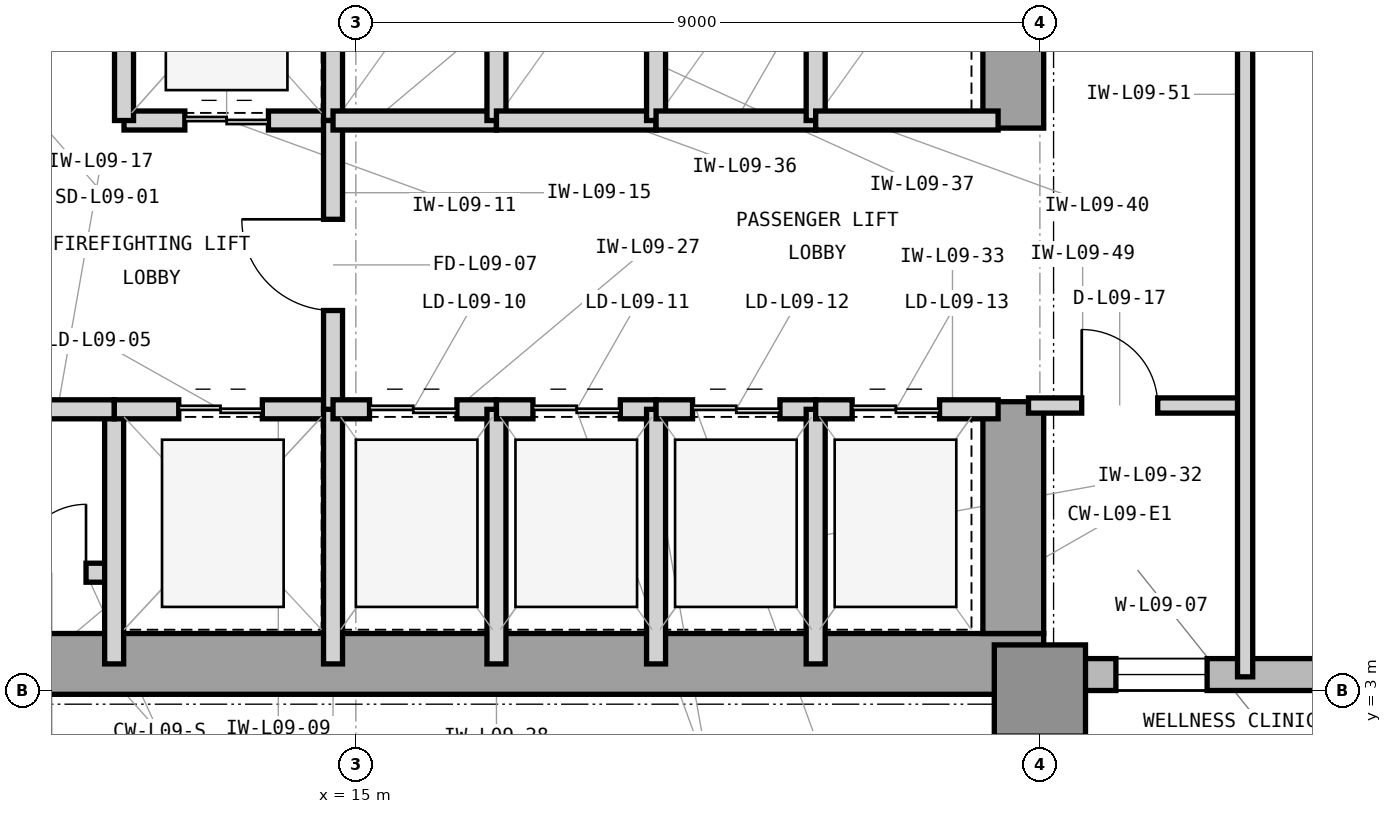
"""IFC4 building model, lengths in metres.
Left out: names, types, materials, properties, quantities, classifications, styles, units other than length and angle.
Written with IfcOpenShell. Run it as: python <this file> out.ifc"""

import sys

from ifc_helpers import new_model, si_unit, direction, frame, frame_2d, origin, origin_2d, place, context, subcontext, project, spatial, rectangle, extrude, element, fill, save


model = new_model("IFC4")
c1 = context("Model", 3, precision=1e-05, world=origin(), true_north=direction((0.0, 1.0)))
c2 = subcontext(c1, "Body", "Model", "MODEL_VIEW")
j1 = project(units=[si_unit("LENGTHUNIT", "METRE"), si_unit("PLANEANGLEUNIT", "RADIAN")], contexts=[c1])
p1 = place(None, origin())
s1 = spatial("IfcSite", under=j1, at=p1, CompositionType="ELEMENT")
p2 = place(p1, origin())
s2 = spatial("IfcBuilding", under=s1, at=p2, CompositionType="ELEMENT")
p3 = place(p2, frame((0.0, 0.0, 42.6)))
s3 = spatial("IfcBuildingStorey", under=s2, at=p3, CompositionType="ELEMENT", Elevation=42.6)
p4 = place(p3, frame((7.475, 3.35, 0.0), z_axis=(0.0, 0.0, 1.0), x_axis=(1.0, 0.0, 0.0)))
e1 = element("IfcWall", 1, at=p4, inside=s3, PredefinedType="SHEAR", context=c2, shape_type="SweptSolid", body=[
    extrude(rectangle(XDim=16.575, YDim=0.8, at=frame_2d((8.288, 0.0))), origin(), (0.0, 0.0, 1.0), 4.2),
])
p5 = place(p3, frame((23.65, 3.75, 0.0), z_axis=(0.0, 0.0, 1.0), x_axis=(0.0, 1.0, 0.0)))
e2 = element("IfcWall", 2, at=p5, inside=s3, PredefinedType="SHEAR", context=c2, shape_type="SweptSolid", body=[
    extrude(rectangle(XDim=3.05, YDim=0.8, at=frame_2d((1.525, 0.0))), origin(), (0.0, 0.0, 1.0), 4.2),
])
p6 = place(p3, frame((23.65, 10.4, 0.0), z_axis=(0.0, 0.0, 1.0), x_axis=(0.0, 1.0, 0.0)))
e3 = element("IfcWall", 3, at=p6, inside=s3, PredefinedType="SHEAR", context=c2, shape_type="SweptSolid", body=[
    extrude(rectangle(XDim=3.2, YDim=0.8, at=frame_2d((1.6, 0.0))), origin(), (0.0, 0.0, 1.0), 4.2),
])
p7 = place(p3, frame((24.0, 3.0, 0.0), z_axis=(0.0, 0.0, 1.0), x_axis=(1.0, 0.0, 0.0)))
e4 = element("IfcColumn", 4, at=p7, inside=s3, PredefinedType="COLUMN", context=c2, shape_type="SweptSolid", body=[
    extrude(rectangle(XDim=1.2, YDim=1.2, at=origin_2d()), origin(), (0.0, 0.0, 1.0), 4.2),
])
p8 = place(p3, frame((23.9, 3.21, 0.0), z_axis=(0.0, 0.0, 1.0), x_axis=(1.0, 0.0, 0.0)))
e5 = element("IfcWall", 5, at=p8, inside=s3, PredefinedType="STANDARD", context=c2, shape_type="SweptSolid", body=[
    extrude(rectangle(XDim=40.5, YDim=0.42, at=frame_2d((20.25, 0.0))), origin(), (0.0, 0.0, 1.0), 3.98),
])
p9 = place(p8, frame((1.1, 0.0, 0.85)))
e6 = element("IfcOpeningElement", 6, at=p9, cuts=e5, PredefinedType="OPENING", context=c2, shape_type="SweptSolid", body=[
    extrude(rectangle(XDim=1.2, YDim=2.45, at=frame_2d((0.6, 1.225))), frame((0.0, 0.22, 0.0), z_axis=(0.0, -1.0, 0.0), x_axis=(1.0, 0.0, 0.0)), (0.0, 0.0, 1.0), 0.44),
])
p10 = place(p8, frame((5.336, 0.0, 0.85)))
e7 = element("IfcOpeningElement", 7, at=p10, cuts=e5, PredefinedType="OPENING", context=c2, shape_type="SweptSolid", body=[
    extrude(rectangle(XDim=2.8, YDim=2.45, at=frame_2d((1.4, 1.225))), frame((0.0, 0.22, 0.0), z_axis=(0.0, -1.0, 0.0), x_axis=(1.0, 0.0, 0.0)), (0.0, 0.0, 1.0), 0.44),
])
p11 = place(p8, frame((14.336, 0.0, 0.85)))
e8 = element("IfcOpeningElement", 8, at=p11, cuts=e5, PredefinedType="OPENING", context=c2, shape_type="SweptSolid", body=[
    extrude(rectangle(XDim=2.8, YDim=2.45, at=frame_2d((1.4, 1.225))), frame((0.0, 0.22, 0.0), z_axis=(0.0, -1.0, 0.0), x_axis=(1.0, 0.0, 0.0)), (0.0, 0.0, 1.0), 0.44),
])
p12 = place(p8, frame((25.136, 0.0, 0.85)))
e9 = element("IfcOpeningElement", 9, at=p12, cuts=e5, PredefinedType="OPENING", context=c2, shape_type="SweptSolid", body=[
    extrude(rectangle(XDim=1.2, YDim=2.45, at=frame_2d((0.6, 1.225))), frame((0.0, 0.22, 0.0), z_axis=(0.0, -1.0, 0.0), x_axis=(1.0, 0.0, 0.0)), (0.0, 0.0, 1.0), 0.44),
])
p13 = place(p8, frame((34.086, 0.0, 0.85)))
e10 = element("IfcOpeningElement", 10, at=p13, cuts=e5, PredefinedType="OPENING", context=c2, shape_type="SweptSolid", body=[
    extrude(rectangle(XDim=1.2, YDim=2.45, at=frame_2d((0.6, 1.225))), frame((0.0, 0.22, 0.0), z_axis=(0.0, -1.0, 0.0), x_axis=(1.0, 0.0, 0.0)), (0.0, 0.0, 1.0), 0.44),
])
p14 = place(p3, frame((10.33, 4.55, 0.0), z_axis=(0.0, 0.0, 1.0), x_axis=(1.0, 0.0, 0.0)))
e11 = element("IfcWall", 11, at=p14, inside=s3, PredefinedType="PARTITIONING", context=c2, shape_type="SweptSolid", body=[
    extrude(rectangle(XDim=1.49, YDim=0.25, at=frame_2d((0.745, 0.0))), origin(), (0.0, 0.0, 1.0), 3.97),
])
p15 = place(p14, frame((0.22, 0.0, 0.0)))
e12 = element("IfcOpeningElement", 12, at=p15, cuts=e11, PredefinedType="OPENING", context=c2, shape_type="SweptSolid", body=[
    extrude(rectangle(XDim=0.9, YDim=2.1, at=frame_2d((0.45, 1.05))), frame((0.0, 0.135, 0.0), z_axis=(0.0, -1.0, 0.0), x_axis=(1.0, 0.0, 0.0)), (0.0, 0.0, 1.0), 0.27),
])
p16 = place(p3, frame((11.82, 3.35, 0.0), z_axis=(0.0, 0.0, 1.0), x_axis=(0.0, 1.0, 0.0)))
e13 = element("IfcWall", 13, at=p16, inside=s3, PredefinedType="PARTITIONING", context=c2, shape_type="SweptSolid", body=[
    extrude(rectangle(XDim=3.35, YDim=0.25, at=frame_2d((1.675, 0.0))), origin(), (0.0, 0.0, 1.0), 3.97),
])
p17 = place(p3, frame((11.82, 6.7, 0.0), z_axis=(0.0, 0.0, 1.0), x_axis=(1.0, 0.0, 0.0)))
e14 = element("IfcWall", 14, at=p17, inside=s3, PredefinedType="PARTITIONING", context=c2, shape_type="SweptSolid", body=[
    extrude(rectangle(XDim=2.88, YDim=0.25, at=frame_2d((1.44, 0.0))), origin(), (0.0, 0.0, 1.0), 3.426),
])
p18 = place(p17, frame((0.85, 0.0, 0.0)))
e15 = element("IfcOpeningElement", 15, at=p18, cuts=e14, PredefinedType="OPENING", context=c2, shape_type="SweptSolid", body=[
    extrude(rectangle(XDim=1.1, YDim=2.25, at=frame_2d((0.55, 1.125))), frame((0.0, 0.135, 0.0), z_axis=(0.0, -1.0, 0.0), x_axis=(1.0, 0.0, 0.0)), (0.0, 0.0, 1.0), 0.27),
])
p19 = place(p3, frame((14.7, 3.35, 0.0), z_axis=(0.0, 0.0, 1.0), x_axis=(0.0, 1.0, 0.0)))
e16 = element("IfcWall", 16, at=p19, inside=s3, PredefinedType="PARTITIONING", context=c2, shape_type="SweptSolid", body=[
    extrude(rectangle(XDim=3.35, YDim=0.25, at=frame_2d((1.675, 0.0))), origin(), (0.0, 0.0, 1.0), 3.97),
])
p20 = place(p3, frame((11.95, 10.5, 0.0), z_axis=(0.0, 0.0, 1.0), x_axis=(1.0, 0.0, 0.0)))
e17 = element("IfcWall", 17, at=p20, inside=s3, PredefinedType="PARTITIONING", context=c2, shape_type="SweptSolid", body=[
    extrude(rectangle(XDim=2.75, YDim=0.25, at=frame_2d((1.375, 0.0))), origin(), (0.0, 0.0, 1.0), 3.426),
])
p21 = place(p20, frame((0.8, 0.0, 0.0)))
e18 = element("IfcOpeningElement", 18, at=p21, cuts=e17, PredefinedType="OPENING", context=c2, shape_type="SweptSolid", body=[
    extrude(rectangle(XDim=1.1, YDim=2.25, at=frame_2d((0.55, 1.125))), frame((0.0, 0.135, 0.0), z_axis=(0.0, -1.0, 0.0), x_axis=(1.0, 0.0, 0.0)), (0.0, 0.0, 1.0), 0.27),
])
for number, where, z_axis, x_axis in (
    (19, (11.95, 10.5, 0.0), (0.0, 0.0, 1.0), (0.0, 1.0, 0.0)),
    (20, (14.7, 10.5, 0.0), (0.0, 0.0, 1.0), (0.0, 1.0, 0.0)),
):
    element("IfcWall", number, at=place(p3, frame(where, z_axis=z_axis, x_axis=x_axis)), inside=s3, PredefinedType="PARTITIONING", context=c2, shape_type="SweptSolid", body=[
        extrude(rectangle(XDim=3.0, YDim=0.25, at=frame_2d((1.5, 0.0))), origin(), (0.0, 0.0, 1.0), 3.97),
    ])
p22 = place(p3, frame((14.7, 6.7, 0.0), z_axis=(0.0, 0.0, 1.0), x_axis=(0.0, 1.0, 0.0)))
e21 = element("IfcWall", 21, at=p22, inside=s3, PredefinedType="PARTITIONING", context=c2, shape_type="SweptSolid", body=[
    extrude(rectangle(XDim=3.8, YDim=0.25, at=frame_2d((1.9, 0.0))), origin(), (0.0, 0.0, 1.0), 3.97),
])
p23 = place(p22, frame((1.3, 0.0, 0.0)))
e22 = element("IfcOpeningElement", 22, at=p23, cuts=e21, PredefinedType="OPENING", context=c2, shape_type="SweptSolid", body=[
    extrude(rectangle(XDim=1.2, YDim=2.2, at=frame_2d((0.6, 1.1))), frame((0.0, 0.135, 0.0), z_axis=(0.0, -1.0, 0.0), x_axis=(1.0, 0.0, 0.0)), (0.0, 0.0, 1.0), 0.27),
])
p24 = place(p3, frame((10.33, 6.7, 0.0), z_axis=(0.0, 0.0, 1.0), x_axis=(1.0, 0.0, 0.0)))
e23 = element("IfcWall", 23, at=p24, inside=s3, PredefinedType="PARTITIONING", context=c2, shape_type="SweptSolid", body=[
    extrude(rectangle(XDim=1.49, YDim=0.25, at=frame_2d((0.745, 0.0))), origin(), (0.0, 0.0, 1.0), 3.426),
])
p25 = place(p3, frame((14.7, 6.7, 0.0), z_axis=(0.0, 0.0, 1.0), x_axis=(1.0, 0.0, 0.0)))
e24 = element("IfcWall", 24, at=p25, inside=s3, PredefinedType="PARTITIONING", context=c2, shape_type="SweptSolid", body=[
    extrude(rectangle(XDim=2.15, YDim=0.25, at=frame_2d((1.075, 0.0))), origin(), (0.0, 0.0, 1.0), 3.426),
])
p26 = place(p25, frame((0.48, 0.0, 0.0)))
e25 = element("IfcOpeningElement", 25, at=p26, cuts=e24, PredefinedType="OPENING", context=c2, shape_type="SweptSolid", body=[
    extrude(rectangle(XDim=1.15, YDim=2.25, at=frame_2d((0.575, 1.125))), frame((0.0, 0.135, 0.0), z_axis=(0.0, -1.0, 0.0), x_axis=(1.0, 0.0, 0.0)), (0.0, 0.0, 1.0), 0.27),
])
p27 = place(p3, frame((16.85, 3.35, 0.0), z_axis=(0.0, 0.0, 1.0), x_axis=(0.0, 1.0, 0.0)))
e26 = element("IfcWall", 26, at=p27, inside=s3, PredefinedType="PARTITIONING", context=c2, shape_type="SweptSolid", body=[
    extrude(rectangle(XDim=3.35, YDim=0.25, at=frame_2d((1.675, 0.0))), origin(), (0.0, 0.0, 1.0), 3.97),
])
p28 = place(p3, frame((16.85, 6.7, 0.0), z_axis=(0.0, 0.0, 1.0), x_axis=(1.0, 0.0, 0.0)))
e27 = element("IfcWall", 27, at=p28, inside=s3, PredefinedType="PARTITIONING", context=c2, shape_type="SweptSolid", body=[
    extrude(rectangle(XDim=2.1, YDim=0.25, at=frame_2d((1.05, 0.0))), origin(), (0.0, 0.0, 1.0), 3.426),
])
p29 = place(p28, frame((0.48, 0.0, 0.0)))
e28 = element("IfcOpeningElement", 28, at=p29, cuts=e27, PredefinedType="OPENING", context=c2, shape_type="SweptSolid", body=[
    extrude(rectangle(XDim=1.15, YDim=2.25, at=frame_2d((0.575, 1.125))), frame((0.0, 0.135, 0.0), z_axis=(0.0, -1.0, 0.0), x_axis=(1.0, 0.0, 0.0)), (0.0, 0.0, 1.0), 0.27),
])
p30 = place(p3, frame((18.95, 3.35, 0.0), z_axis=(0.0, 0.0, 1.0), x_axis=(0.0, 1.0, 0.0)))
e29 = element("IfcWall", 29, at=p30, inside=s3, PredefinedType="PARTITIONING", context=c2, shape_type="SweptSolid", body=[
    extrude(rectangle(XDim=3.35, YDim=0.25, at=frame_2d((1.675, 0.0))), origin(), (0.0, 0.0, 1.0), 3.97),
])
p31 = place(p3, frame((18.95, 6.7, 0.0), z_axis=(0.0, 0.0, 1.0), x_axis=(1.0, 0.0, 0.0)))
e30 = element("IfcWall", 30, at=p31, inside=s3, PredefinedType="PARTITIONING", context=c2, shape_type="SweptSolid", body=[
    extrude(rectangle(XDim=2.1, YDim=0.25, at=frame_2d((1.05, 0.0))), origin(), (0.0, 0.0, 1.0), 3.426),
])
p32 = place(p31, frame((0.48, 0.0, 0.0)))
e31 = element("IfcOpeningElement", 31, at=p32, cuts=e30, PredefinedType="OPENING", context=c2, shape_type="SweptSolid", body=[
    extrude(rectangle(XDim=1.15, YDim=2.25, at=frame_2d((0.575, 1.125))), frame((0.0, 0.135, 0.0), z_axis=(0.0, -1.0, 0.0), x_axis=(1.0, 0.0, 0.0)), (0.0, 0.0, 1.0), 0.27),
])
p33 = place(p3, frame((21.05, 3.35, 0.0), z_axis=(0.0, 0.0, 1.0), x_axis=(0.0, 1.0, 0.0)))
e32 = element("IfcWall", 32, at=p33, inside=s3, PredefinedType="PARTITIONING", context=c2, shape_type="SweptSolid", body=[
    extrude(rectangle(XDim=3.35, YDim=0.25, at=frame_2d((1.675, 0.0))), origin(), (0.0, 0.0, 1.0), 3.97),
])
p34 = place(p3, frame((21.05, 6.7, 0.0), z_axis=(0.0, 0.0, 1.0), x_axis=(1.0, 0.0, 0.0)))
e33 = element("IfcWall", 33, at=p34, inside=s3, PredefinedType="PARTITIONING", context=c2, shape_type="SweptSolid", body=[
    extrude(rectangle(XDim=2.4, YDim=0.25, at=frame_2d((1.2, 0.0))), origin(), (0.0, 0.0, 1.0), 3.426),
])
p35 = place(p34, frame((0.48, 0.0, 0.0)))
e34 = element("IfcOpeningElement", 34, at=p35, cuts=e33, PredefinedType="OPENING", context=c2, shape_type="SweptSolid", body=[
    extrude(rectangle(XDim=1.15, YDim=2.25, at=frame_2d((0.575, 1.125))), frame((0.0, 0.135, 0.0), z_axis=(0.0, -1.0, 0.0), x_axis=(1.0, 0.0, 0.0)), (0.0, 0.0, 1.0), 0.27),
])
p36 = place(p3, frame((14.7, 10.5, 0.0), z_axis=(0.0, 0.0, 1.0), x_axis=(1.0, 0.0, 0.0)))
e35 = element("IfcWall", 35, at=p36, inside=s3, PredefinedType="PARTITIONING", context=c2, shape_type="SweptSolid", body=[
    extrude(rectangle(XDim=2.15, YDim=0.25, at=frame_2d((1.075, 0.0))), origin(), (0.0, 0.0, 1.0), 3.426),
])
p37 = place(p3, frame((16.85, 10.5, 0.0), z_axis=(0.0, 0.0, 1.0), x_axis=(0.0, 1.0, 0.0)))
e36 = element("IfcWall", 36, at=p37, inside=s3, PredefinedType="PARTITIONING", context=c2, shape_type="SweptSolid", body=[
    extrude(rectangle(XDim=3.0, YDim=0.25, at=frame_2d((1.5, 0.0))), origin(), (0.0, 0.0, 1.0), 3.97),
])
p38 = place(p3, frame((16.85, 10.5, 0.0), z_axis=(0.0, 0.0, 1.0), x_axis=(1.0, 0.0, 0.0)))
e37 = element("IfcWall", 37, at=p38, inside=s3, PredefinedType="PARTITIONING", context=c2, shape_type="SweptSolid", body=[
    extrude(rectangle(XDim=2.1, YDim=0.25, at=frame_2d((1.05, 0.0))), origin(), (0.0, 0.0, 1.0), 3.426),
])
p39 = place(p3, frame((18.95, 10.5, 0.0), z_axis=(0.0, 0.0, 1.0), x_axis=(0.0, 1.0, 0.0)))
e38 = element("IfcWall", 38, at=p39, inside=s3, PredefinedType="PARTITIONING", context=c2, shape_type="SweptSolid", body=[
    extrude(rectangle(XDim=3.0, YDim=0.25, at=frame_2d((1.5, 0.0))), origin(), (0.0, 0.0, 1.0), 3.97),
])
p40 = place(p3, frame((18.95, 10.5, 0.0), z_axis=(0.0, 0.0, 1.0), x_axis=(1.0, 0.0, 0.0)))
e39 = element("IfcWall", 39, at=p40, inside=s3, PredefinedType="PARTITIONING", context=c2, shape_type="SweptSolid", body=[
    extrude(rectangle(XDim=2.1, YDim=0.25, at=frame_2d((1.05, 0.0))), origin(), (0.0, 0.0, 1.0), 3.426),
])
p41 = place(p3, frame((21.05, 10.5, 0.0), z_axis=(0.0, 0.0, 1.0), x_axis=(0.0, 1.0, 0.0)))
e40 = element("IfcWall", 40, at=p41, inside=s3, PredefinedType="PARTITIONING", context=c2, shape_type="SweptSolid", body=[
    extrude(rectangle(XDim=3.0, YDim=0.25, at=frame_2d((1.5, 0.0))), origin(), (0.0, 0.0, 1.0), 3.97),
])
p42 = place(p3, frame((21.05, 10.5, 0.0), z_axis=(0.0, 0.0, 1.0), x_axis=(1.0, 0.0, 0.0)))
e41 = element("IfcWall", 41, at=p42, inside=s3, PredefinedType="PARTITIONING", context=c2, shape_type="SweptSolid", body=[
    extrude(rectangle(XDim=2.4, YDim=0.25, at=frame_2d((1.2, 0.0))), origin(), (0.0, 0.0, 1.0), 3.426),
])
p43 = place(p3, frame((23.85, 6.75, 0.0), z_axis=(0.0, 0.0, 1.0), x_axis=(1.0, 0.0, 0.0)))
e42 = element("IfcWall", 42, at=p43, inside=s3, PredefinedType="PARTITIONING", context=c2, shape_type="SweptSolid", body=[
    extrude(rectangle(XDim=2.85, YDim=0.2, at=frame_2d((1.425, 0.0))), origin(), (0.0, 0.0, 1.0), 3.97),
])
p44 = place(p43, frame((0.7, 0.0, 0.0)))
e43 = element("IfcOpeningElement", 43, at=p44, cuts=e42, PredefinedType="OPENING", context=c2, shape_type="SweptSolid", body=[
    extrude(rectangle(XDim=1.0, YDim=2.15, at=frame_2d((0.5, 1.075))), frame((0.0, 0.11, 0.0), z_axis=(0.0, -1.0, 0.0), x_axis=(1.0, 0.0, 0.0)), (0.0, 0.0, 1.0), 0.22),
])
p45 = place(p3, frame((26.7, 3.18, 0.0), z_axis=(0.0, 0.0, 1.0), x_axis=(0.0, 1.0, 0.0)))
e44 = element("IfcWall", 44, at=p45, inside=s3, PredefinedType="PARTITIONING", context=c2, shape_type="SweptSolid", body=[
    extrude(rectangle(XDim=10.22, YDim=0.2, at=frame_2d((5.11, 0.0))), origin(), (0.0, 0.0, 1.0), 3.97),
])
p46 = place(p15, origin())
e45 = element("IfcDoor", 45, at=p46, inside=s3, OperationType="SINGLE_SWING_RIGHT", PredefinedType="TRAPDOOR", context=c2, shape_type="SweptSolid", body=[
    extrude(rectangle(XDim=0.9, YDim=2.1, at=frame_2d((0.45, 1.05))), frame((0.0, 0.025, 0.0), z_axis=(0.0, -1.0, 0.0), x_axis=(1.0, 0.0, 0.0)), (0.0, 0.0, 1.0), 0.05),
])
fill(e12, e45)
p47 = place(p18, origin())
e46 = element("IfcDoor", 46, at=p47, inside=s3, OperationType="DOUBLE_DOOR_SLIDING", PredefinedType="DOOR", context=c2, shape_type="SweptSolid", body=[
    extrude(rectangle(XDim=1.1, YDim=2.25, at=frame_2d((0.55, 1.125))), frame((0.0, 0.025, 0.0), z_axis=(0.0, -1.0, 0.0), x_axis=(1.0, 0.0, 0.0)), (0.0, 0.0, 1.0), 0.05),
])
fill(e15, e46)
p48 = place(p21, origin())
e47 = element("IfcDoor", 47, at=p48, inside=s3, OperationType="DOUBLE_DOOR_SLIDING", PredefinedType="DOOR", context=c2, shape_type="SweptSolid", body=[
    extrude(rectangle(XDim=1.1, YDim=2.25, at=frame_2d((0.55, 1.125))), frame((0.0, 0.025, 0.0), z_axis=(0.0, -1.0, 0.0), x_axis=(1.0, 0.0, 0.0)), (0.0, 0.0, 1.0), 0.05),
])
fill(e18, e47)
p49 = place(p23, origin())
e48 = element("IfcDoor", 48, at=p49, inside=s3, OperationType="SINGLE_SWING_RIGHT", PredefinedType="DOOR", context=c2, shape_type="SweptSolid", body=[
    extrude(rectangle(XDim=1.2, YDim=2.2, at=frame_2d((0.6, 1.1))), frame((0.0, 0.025, 0.0), z_axis=(0.0, -1.0, 0.0), x_axis=(1.0, 0.0, 0.0)), (0.0, 0.0, 1.0), 0.05),
])
fill(e22, e48)
p50 = place(p26, origin())
e49 = element("IfcDoor", 49, at=p50, inside=s3, OperationType="DOUBLE_DOOR_SLIDING", PredefinedType="DOOR", context=c2, shape_type="SweptSolid", body=[
    extrude(rectangle(XDim=1.15, YDim=2.25, at=frame_2d((0.575, 1.125))), frame((0.0, 0.025, 0.0), z_axis=(0.0, -1.0, 0.0), x_axis=(1.0, 0.0, 0.0)), (0.0, 0.0, 1.0), 0.05),
])
fill(e25, e49)
p51 = place(p29, origin())
e50 = element("IfcDoor", 50, at=p51, inside=s3, OperationType="DOUBLE_DOOR_SLIDING", PredefinedType="DOOR", context=c2, shape_type="SweptSolid", body=[
    extrude(rectangle(XDim=1.15, YDim=2.25, at=frame_2d((0.575, 1.125))), frame((0.0, 0.025, 0.0), z_axis=(0.0, -1.0, 0.0), x_axis=(1.0, 0.0, 0.0)), (0.0, 0.0, 1.0), 0.05),
])
fill(e28, e50)
p52 = place(p32, origin())
e51 = element("IfcDoor", 51, at=p52, inside=s3, OperationType="DOUBLE_DOOR_SLIDING", PredefinedType="DOOR", context=c2, shape_type="SweptSolid", body=[
    extrude(rectangle(XDim=1.15, YDim=2.25, at=frame_2d((0.575, 1.125))), frame((0.0, 0.025, 0.0), z_axis=(0.0, -1.0, 0.0), x_axis=(1.0, 0.0, 0.0)), (0.0, 0.0, 1.0), 0.05),
])
fill(e31, e51)
p53 = place(p35, origin())
e52 = element("IfcDoor", 52, at=p53, inside=s3, OperationType="DOUBLE_DOOR_SLIDING", PredefinedType="DOOR", context=c2, shape_type="SweptSolid", body=[
    extrude(rectangle(XDim=1.15, YDim=2.25, at=frame_2d((0.575, 1.125))), frame((0.0, 0.025, 0.0), z_axis=(0.0, -1.0, 0.0), x_axis=(1.0, 0.0, 0.0)), (0.0, 0.0, 1.0), 0.05),
])
fill(e34, e52)
p54 = place(p44, origin())
e53 = element("IfcDoor", 53, at=p54, inside=s3, OperationType="SINGLE_SWING_LEFT", PredefinedType="DOOR", context=c2, shape_type="SweptSolid", body=[
    extrude(rectangle(XDim=1.0, YDim=2.15, at=frame_2d((0.5, 1.075))), frame((0.0, 0.025, 0.0), z_axis=(0.0, -1.0, 0.0), x_axis=(1.0, 0.0, 0.0)), (0.0, 0.0, 1.0), 0.05),
])
fill(e43, e53)
p55 = place(p9, origin())
e54 = element("IfcWindow", 54, at=p55, inside=s3, PartitioningType="SINGLE_PANEL", PredefinedType="WINDOW", context=c2, shape_type="SweptSolid", body=[
    extrude(rectangle(XDim=1.2, YDim=2.45, at=frame_2d((0.6, 1.225))), frame((0.0, 0.11, 0.0), z_axis=(0.0, -1.0, 0.0), x_axis=(1.0, 0.0, 0.0)), (0.0, 0.0, 1.0), 0.06),
])
fill(e6, e54)
save(model, sys.argv[1])
